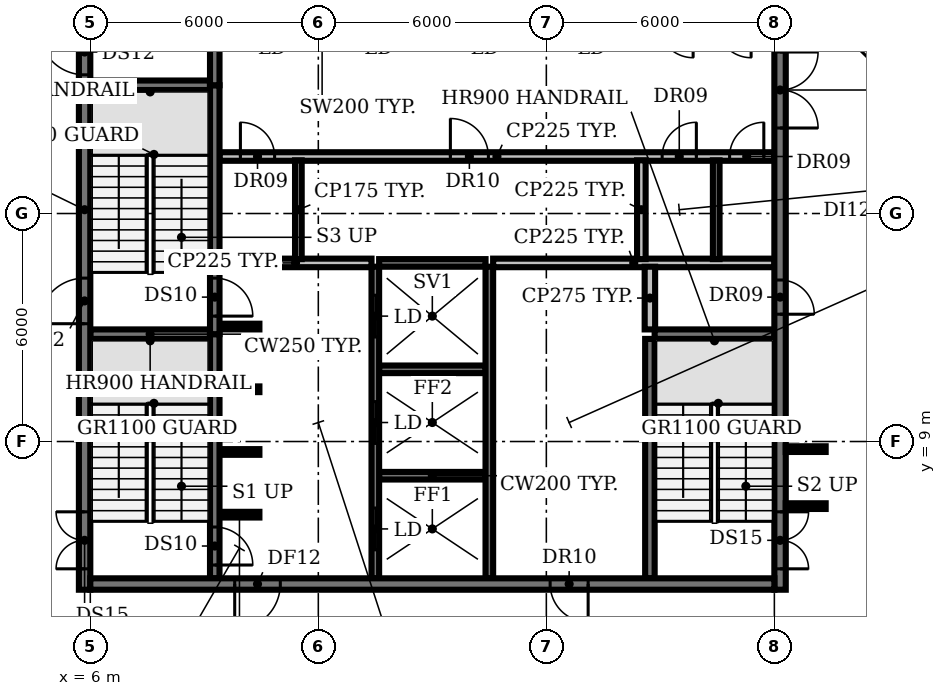
"""IFC4 building model, lengths in metres.
Left out: names, types, materials, properties, quantities, classifications, styles, units other than length and angle.
Written with IfcOpenShell. Run it as: python <this file> out.ifc"""

import sys

from ifc_helpers import new_model, si_unit, direction, frame, frame_2d, origin, place, context, subcontext, project, spatial, rectangle, extrude, element, fill, save


model = new_model("IFC4")
c1 = context("Model", 3, precision=1e-05, world=origin(), true_north=direction((0.0, 1.0)))
c2 = subcontext(c1, "Body", "Model", "MODEL_VIEW")
j1 = project(units=[si_unit("LENGTHUNIT", "METRE"), si_unit("PLANEANGLEUNIT", "RADIAN")], contexts=[c1])
p1 = place(None, origin())
s1 = spatial("IfcSite", under=j1, at=p1, CompositionType="ELEMENT")
p2 = place(p1, origin())
s2 = spatial("IfcBuilding", under=s1, at=p2, CompositionType="ELEMENT")
p3 = place(p2, frame((0.0, 0.0, 289.4)))
s3 = spatial("IfcBuildingStorey", under=s2, at=p3, CompositionType="ELEMENT", Elevation=289.4)
p4 = place(p3, frame((9.4, 7.075, 0.0), z_axis=(0.0, 0.0, 1.0), x_axis=(1.0, 0.0, 0.0)))
e1 = element("IfcWall", 1, at=p4, inside=s3, PredefinedType="SHEAR", context=c2, shape_type="SweptSolid", body=[
    extrude(rectangle(XDim=1.05, YDim=0.15, at=frame_2d((0.525, 0.0))), origin(), (0.0, 0.0, 1.0), 3.85),
])
p5 = place(p3, frame((13.6, 8.1, 0.0), z_axis=(0.0, 0.0, 1.0), x_axis=(1.0, 0.0, 0.0)))
e2 = element("IfcWall", 2, at=p5, inside=s3, PredefinedType="SHEAR", context=c2, shape_type="SweptSolid", body=[
    extrude(rectangle(XDim=2.8, YDim=0.2, at=frame_2d((1.4, 0.0))), origin(), (0.0, 0.0, 1.0), 3.85),
])
for number, where, z_axis, x_axis in (
    (3, (9.4, 8.725, 0.0), (0.0, 0.0, 1.0), (1.0, 0.0, 0.0)),
    (4, (9.4, 10.375, 0.0), (0.0, 0.0, 1.0), (1.0, 0.0, 0.0)),
):
    element("IfcWall", number, at=place(p3, frame(where, z_axis=z_axis, x_axis=x_axis)), inside=s3, PredefinedType="SHEAR", context=c2, shape_type="SweptSolid", body=[
        extrude(rectangle(XDim=1.05, YDim=0.15, at=frame_2d((0.525, 0.0))), origin(), (0.0, 0.0, 1.0), 3.85),
    ])
p6 = place(p3, frame((13.6, 10.9, 0.0), z_axis=(0.0, 0.0, 1.0), x_axis=(1.0, 0.0, 0.0)))
e5 = element("IfcWall", 5, at=p6, inside=s3, PredefinedType="SHEAR", context=c2, shape_type="SweptSolid", body=[
    extrude(rectangle(XDim=2.8, YDim=0.2, at=frame_2d((1.4, 0.0))), origin(), (0.0, 0.0, 1.0), 3.85),
])
for number, where, z_axis, x_axis in (
    (6, (6.0, 11.825, 0.0), (0.0, 0.0, 1.0), (1.0, 0.0, 0.0)),
    (7, (20.85, 11.825, 0.0), (0.0, 0.0, 1.0), (1.0, 0.0, 0.0)),
):
    element("IfcWall", number, at=place(p3, frame(where, z_axis=z_axis, x_axis=x_axis)), inside=s3, PredefinedType="SHEAR", context=c2, shape_type="SweptSolid", body=[
        extrude(rectangle(XDim=3.15, YDim=0.25, at=frame_2d((1.575, 0.0))), origin(), (0.0, 0.0, 1.0), 3.85),
    ])
p7 = place(p3, frame((9.4, 12.025, 0.0), z_axis=(0.0, 0.0, 1.0), x_axis=(1.0, 0.0, 0.0)))
e8 = element("IfcWall", 8, at=p7, inside=s3, PredefinedType="SHEAR", context=c2, shape_type="SweptSolid", body=[
    extrude(rectangle(XDim=1.05, YDim=0.15, at=frame_2d((0.525, 0.0))), origin(), (0.0, 0.0, 1.0), 3.85),
])
p8 = place(p3, frame((9.4, 13.7, 0.0), z_axis=(0.0, 0.0, 1.0), x_axis=(1.0, 0.0, 0.0)))
e9 = element("IfcWall", 9, at=p8, inside=s3, PredefinedType="PARTITIONING", context=c2, shape_type="SweptSolid", body=[
    extrude(rectangle(XDim=4.0, YDim=0.225, at=frame_2d((2.0, 0.0))), origin(), (0.0, 0.0, 1.0), 3.85),
])
p9 = place(p3, frame((13.6, 13.7, 0.0), z_axis=(0.0, 0.0, 1.0), x_axis=(1.0, 0.0, 0.0)))
e10 = element("IfcWall", 10, at=p9, inside=s3, PredefinedType="SHEAR", context=c2, shape_type="SweptSolid", body=[
    extrude(rectangle(XDim=2.8, YDim=0.2, at=frame_2d((1.4, 0.0))), origin(), (0.0, 0.0, 1.0), 3.85),
])
p10 = place(p3, frame((16.6, 13.7, 0.0), z_axis=(0.0, 0.0, 1.0), x_axis=(1.0, 0.0, 0.0)))
e11 = element("IfcWall", 11, at=p10, inside=s3, PredefinedType="PARTITIONING", context=c2, shape_type="SweptSolid", body=[
    extrude(rectangle(XDim=7.4, YDim=0.225, at=frame_2d((3.7, 0.0))), origin(), (0.0, 0.0, 1.0), 3.85),
])
p11 = place(p3, frame((9.4, 16.5, 0.0), z_axis=(0.0, 0.0, 1.0), x_axis=(1.0, 0.0, 0.0)))
e12 = element("IfcWall", 12, at=p11, inside=s3, PredefinedType="PARTITIONING", context=c2, shape_type="SweptSolid", body=[
    extrude(rectangle(XDim=14.6, YDim=0.225, at=frame_2d((7.3, 0.0))), origin(), (0.0, 0.0, 1.0), 3.85),
])
p12 = place(p11, frame((0.55, 0.0, 0.0)))
e13 = element("IfcOpeningElement", 13, at=p12, cuts=e12, PredefinedType="OPENING", context=c2, shape_type="SweptSolid", body=[
    extrude(rectangle(XDim=0.9, YDim=2.1, at=frame_2d((0.45, 1.05))), frame((0.0, 0.123, 0.0), z_axis=(0.0, -1.0, 0.0), x_axis=(1.0, 0.0, 0.0)), (0.0, 0.0, 1.0), 0.245),
])
p13 = place(p11, frame((6.075, 0.0, 0.0)))
e14 = element("IfcOpeningElement", 14, at=p13, cuts=e12, PredefinedType="OPENING", context=c2, shape_type="SweptSolid", body=[
    extrude(rectangle(XDim=1.0, YDim=2.1, at=frame_2d((0.5, 1.05))), frame((0.0, 0.123, 0.0), z_axis=(0.0, -1.0, 0.0), x_axis=(1.0, 0.0, 0.0)), (0.0, 0.0, 1.0), 0.245),
])
p14 = place(p11, frame((11.647, 0.0, 0.0)))
e15 = element("IfcOpeningElement", 15, at=p14, cuts=e12, PredefinedType="OPENING", context=c2, shape_type="SweptSolid", body=[
    extrude(rectangle(XDim=0.9, YDim=2.1, at=frame_2d((0.45, 1.05))), frame((0.0, 0.123, 0.0), z_axis=(0.0, -1.0, 0.0), x_axis=(1.0, 0.0, 0.0)), (0.0, 0.0, 1.0), 0.245),
])
p15 = place(p11, frame((13.423, 0.0, 0.0)))
e16 = element("IfcOpeningElement", 16, at=p15, cuts=e12, PredefinedType="OPENING", context=c2, shape_type="SweptSolid", body=[
    extrude(rectangle(XDim=0.9, YDim=2.1, at=frame_2d((0.45, 1.05))), frame((0.0, 0.123, 0.0), z_axis=(0.0, -1.0, 0.0), x_axis=(1.0, 0.0, 0.0)), (0.0, 0.0, 1.0), 0.245),
])
p16 = place(p3, frame((6.0, 18.375, 0.0), z_axis=(0.0, 0.0, 1.0), x_axis=(1.0, 0.0, 0.0)))
e17 = element("IfcWall", 17, at=p16, inside=s3, PredefinedType="SHEAR", context=c2, shape_type="SweptSolid", body=[
    extrude(rectangle(XDim=3.15, YDim=0.25, at=frame_2d((1.575, 0.0))), origin(), (0.0, 0.0, 1.0), 3.85),
])
p17 = place(p3, frame((9.275, 11.825, 0.0), z_axis=(0.0, 0.0, 1.0), x_axis=(0.0, -1.0, 0.0)))
e18 = element("IfcWall", 18, at=p17, inside=s3, PredefinedType="SHEAR", context=c2, shape_type="SweptSolid", body=[
    extrude(rectangle(XDim=6.425, YDim=0.25, at=frame_2d((3.212, 0.0))), origin(), (0.0, 0.0, 1.0), 3.85),
])
p18 = place(p17, frame((5.075, 0.0, 0.0)))
e19 = element("IfcOpeningElement", 19, at=p18, cuts=e18, PredefinedType="OPENING", context=c2, shape_type="SweptSolid", body=[
    extrude(rectangle(XDim=1.0, YDim=2.1, at=frame_2d((0.5, 1.05))), frame((0.0, 0.135, 0.0), z_axis=(0.0, -1.0, 0.0), x_axis=(1.0, 0.0, 0.0)), (0.0, 0.0, 1.0), 0.27),
])
p19 = place(p3, frame((9.275, 18.375, 0.0), z_axis=(0.0, 0.0, 1.0), x_axis=(0.0, -1.0, 0.0)))
e20 = element("IfcWall", 20, at=p19, inside=s3, PredefinedType="SHEAR", context=c2, shape_type="SweptSolid", body=[
    extrude(rectangle(XDim=6.55, YDim=0.25, at=frame_2d((3.275, 0.0))), origin(), (0.0, 0.0, 1.0), 3.85),
])
p20 = place(p19, frame((5.075, 0.0, 0.0)))
e21 = element("IfcOpeningElement", 21, at=p20, cuts=e20, PredefinedType="OPENING", context=c2, shape_type="SweptSolid", body=[
    extrude(rectangle(XDim=1.0, YDim=2.1, at=frame_2d((0.5, 1.05))), frame((0.0, 0.135, 0.0), z_axis=(0.0, -1.0, 0.0), x_axis=(1.0, 0.0, 0.0)), (0.0, 0.0, 1.0), 0.27),
])
p21 = place(p3, frame((9.275, 18.375, 0.0), z_axis=(0.0, 0.0, 1.0), x_axis=(0.0, 1.0, 0.0)))
e22 = element("IfcWall", 22, at=p21, inside=s3, PredefinedType="SHEAR", context=c2, shape_type="SweptSolid", body=[
    extrude(rectangle(XDim=6.425, YDim=0.25, at=frame_2d((3.212, 0.0))), origin(), (0.0, 0.0, 1.0), 3.85),
])
p22 = place(p3, frame((11.475, 13.8, 0.0), z_axis=(0.0, 0.0, 1.0), x_axis=(0.0, 1.0, 0.0)))
e23 = element("IfcWall", 23, at=p22, inside=s3, PredefinedType="PARTITIONING", context=c2, shape_type="SweptSolid", body=[
    extrude(rectangle(XDim=2.6, YDim=0.175, at=frame_2d((1.3, 0.0))), origin(), (0.0, 0.0, 1.0), 3.85),
])
p23 = place(p3, frame((13.5, 5.4, 0.0), z_axis=(0.0, 0.0, 1.0), x_axis=(0.0, 1.0, 0.0)))
e24 = element("IfcWall", 24, at=p23, inside=s3, PredefinedType="SHEAR", context=c2, shape_type="SweptSolid", body=[
    extrude(rectangle(XDim=8.2, YDim=0.2, at=frame_2d((4.1, 0.0))), origin(), (0.0, 0.0, 1.0), 3.85),
])
p24 = place(p23, frame((0.75, 0.0, 0.0)))
e25 = element("IfcOpeningElement", 25, at=p24, cuts=e24, PredefinedType="OPENING", context=c2, shape_type="SweptSolid", body=[
    extrude(rectangle(XDim=1.1, YDim=2.1, at=frame_2d((0.55, 1.05))), frame((0.0, 0.11, 0.0), z_axis=(0.0, -1.0, 0.0), x_axis=(1.0, 0.0, 0.0)), (0.0, 0.0, 1.0), 0.22),
])
p25 = place(p23, frame((3.55, 0.0, 0.0)))
e26 = element("IfcOpeningElement", 26, at=p25, cuts=e24, PredefinedType="OPENING", context=c2, shape_type="SweptSolid", body=[
    extrude(rectangle(XDim=1.1, YDim=2.1, at=frame_2d((0.55, 1.05))), frame((0.0, 0.11, 0.0), z_axis=(0.0, -1.0, 0.0), x_axis=(1.0, 0.0, 0.0)), (0.0, 0.0, 1.0), 0.22),
])
p26 = place(p23, frame((6.35, 0.0, 0.0)))
e27 = element("IfcOpeningElement", 27, at=p26, cuts=e24, PredefinedType="OPENING", context=c2, shape_type="SweptSolid", body=[
    extrude(rectangle(XDim=1.1, YDim=2.1, at=frame_2d((0.55, 1.05))), frame((0.0, 0.11, 0.0), z_axis=(0.0, -1.0, 0.0), x_axis=(1.0, 0.0, 0.0)), (0.0, 0.0, 1.0), 0.22),
])
p27 = place(p3, frame((16.5, 5.4, 0.0), z_axis=(0.0, 0.0, 1.0), x_axis=(0.0, 1.0, 0.0)))
e28 = element("IfcWall", 28, at=p27, inside=s3, PredefinedType="SHEAR", context=c2, shape_type="SweptSolid", body=[
    extrude(rectangle(XDim=8.2, YDim=0.2, at=frame_2d((4.1, 0.0))), origin(), (0.0, 0.0, 1.0), 3.85),
])
p28 = place(p3, frame((20.5, 13.8, 0.0), z_axis=(0.0, 0.0, 1.0), x_axis=(0.0, 1.0, 0.0)))
e29 = element("IfcWall", 29, at=p28, inside=s3, PredefinedType="PARTITIONING", context=c2, shape_type="SweptSolid", body=[
    extrude(rectangle(XDim=2.6, YDim=0.225, at=frame_2d((1.3, 0.0))), origin(), (0.0, 0.0, 1.0), 3.85),
])
p29 = place(p3, frame((20.725, 5.4, 0.0), z_axis=(0.0, 0.0, 1.0), x_axis=(0.0, 1.0, 0.0)))
e30 = element("IfcWall", 30, at=p29, inside=s3, PredefinedType="SHEAR", context=c2, shape_type="SweptSolid", body=[
    extrude(rectangle(XDim=6.3, YDim=0.25, at=frame_2d((3.15, 0.0))), origin(), (0.0, 0.0, 1.0), 3.85),
])
p30 = place(p3, frame((20.725, 11.95, 0.0), z_axis=(0.0, 0.0, 1.0), x_axis=(0.0, 1.0, 0.0)))
e31 = element("IfcWall", 31, at=p30, inside=s3, PredefinedType="PARTITIONING", context=c2, shape_type="SweptSolid", body=[
    extrude(rectangle(XDim=1.65, YDim=0.275, at=frame_2d((0.825, 0.0))), origin(), (0.0, 0.0, 1.0), 3.85),
])
p31 = place(p3, frame((22.47, 13.8, 0.0), z_axis=(0.0, 0.0, 1.0), x_axis=(0.0, 1.0, 0.0)))
e32 = element("IfcWall", 32, at=p31, inside=s3, PredefinedType="PARTITIONING", context=c2, shape_type="SweptSolid", body=[
    extrude(rectangle(XDim=2.6, YDim=0.175, at=frame_2d((1.3, 0.0))), origin(), (0.0, 0.0, 1.0), 3.85),
])
p32 = place(p3, frame((5.85, 5.1, 0.0), z_axis=(0.0, 0.0, 1.0), x_axis=(0.0, 1.0, 0.0)))
e33 = element("IfcWall", 33, at=p32, inside=s3, PredefinedType="SHEAR", context=c2, shape_type="SweptSolid", body=[
    extrude(rectangle(XDim=20.0, YDim=0.3, at=frame_2d((10.0, 0.0))), origin(), (0.0, 0.0, 1.0), 3.85),
])
p33 = place(p32, frame((0.55, 0.0, 0.0)))
e34 = element("IfcOpeningElement", 34, at=p33, cuts=e33, PredefinedType="OPENING", context=c2, shape_type="SweptSolid", body=[
    extrude(rectangle(XDim=1.5, YDim=2.1, at=frame_2d((0.75, 1.05))), frame((0.0, 0.16, 0.0), z_axis=(0.0, -1.0, 0.0), x_axis=(1.0, 0.0, 0.0)), (0.0, 0.0, 1.0), 0.32),
])
p34 = place(p32, frame((7.0, 0.0, 0.0)))
e35 = element("IfcOpeningElement", 35, at=p34, cuts=e33, PredefinedType="OPENING", context=c2, shape_type="SweptSolid", body=[
    extrude(rectangle(XDim=1.2, YDim=2.1, at=frame_2d((0.6, 1.05))), frame((0.0, 0.16, 0.0), z_axis=(0.0, -1.0, 0.0), x_axis=(1.0, 0.0, 0.0)), (0.0, 0.0, 1.0), 0.32),
])
p35 = place(p32, frame((13.55, 0.0, 0.0)))
e36 = element("IfcOpeningElement", 36, at=p35, cuts=e33, PredefinedType="OPENING", context=c2, shape_type="SweptSolid", body=[
    extrude(rectangle(XDim=1.2, YDim=2.1, at=frame_2d((0.6, 1.05))), frame((0.0, 0.16, 0.0), z_axis=(0.0, -1.0, 0.0), x_axis=(1.0, 0.0, 0.0)), (0.0, 0.0, 1.0), 0.32),
])
p36 = place(p3, frame((24.15, 25.655, 0.0), z_axis=(0.0, 0.0, 1.0), x_axis=(0.0, -1.0, 0.0)))
e37 = element("IfcWall", 37, at=p36, inside=s3, PredefinedType="SHEAR", context=c2, shape_type="SweptSolid", body=[
    extrude(rectangle(XDim=20.555, YDim=0.3, at=frame_2d((10.277, 0.0))), origin(), (0.0, 0.0, 1.0), 3.85),
])
p37 = place(p36, frame((18.505, 0.0, 0.0)))
e38 = element("IfcOpeningElement", 38, at=p37, cuts=e37, PredefinedType="OPENING", context=c2, shape_type="SweptSolid", body=[
    extrude(rectangle(XDim=1.5, YDim=2.1, at=frame_2d((0.75, 1.05))), frame((0.0, 0.16, 0.0), z_axis=(0.0, -1.0, 0.0), x_axis=(1.0, 0.0, 0.0)), (0.0, 0.0, 1.0), 0.32),
])
p38 = place(p36, frame((12.405, 0.0, 0.0)))
e39 = element("IfcOpeningElement", 39, at=p38, cuts=e37, PredefinedType="OPENING", context=c2, shape_type="SweptSolid", body=[
    extrude(rectangle(XDim=0.9, YDim=2.1, at=frame_2d((0.45, 1.05))), frame((0.0, 0.16, 0.0), z_axis=(0.0, -1.0, 0.0), x_axis=(1.0, 0.0, 0.0)), (0.0, 0.0, 1.0), 0.32),
])
p39 = place(p36, frame((6.405, 0.0, 0.0)))
e40 = element("IfcOpeningElement", 40, at=p39, cuts=e37, PredefinedType="OPENING", context=c2, shape_type="SweptSolid", body=[
    extrude(rectangle(XDim=2.0, YDim=2.1, at=frame_2d((1.0, 1.05))), frame((0.0, 0.16, 0.0), z_axis=(0.0, -1.0, 0.0), x_axis=(1.0, 0.0, 0.0)), (0.0, 0.0, 1.0), 0.32),
])
p40 = place(p3, frame((24.0, 5.25, 0.0), z_axis=(0.0, 0.0, 1.0), x_axis=(-1.0, 0.0, 0.0)))
e41 = element("IfcWall", 41, at=p40, inside=s3, PredefinedType="SHEAR", context=c2, shape_type="SweptSolid", body=[
    extrude(rectangle(XDim=18.0, YDim=0.3, at=frame_2d((9.0, 0.0))), origin(), (0.0, 0.0, 1.0), 3.85),
])
p41 = place(p40, frame((13.0, 0.0, 0.0)))
e42 = element("IfcOpeningElement", 42, at=p41, cuts=e41, PredefinedType="OPENING", context=c2, shape_type="SweptSolid", body=[
    extrude(rectangle(XDim=1.2, YDim=2.1, at=frame_2d((0.6, 1.05))), frame((0.0, 0.16, 0.0), z_axis=(0.0, -1.0, 0.0), x_axis=(1.0, 0.0, 0.0)), (0.0, 0.0, 1.0), 0.32),
])
p42 = place(p40, frame((4.9, 0.0, 0.0)))
e43 = element("IfcOpeningElement", 43, at=p42, cuts=e41, PredefinedType="OPENING", context=c2, shape_type="SweptSolid", body=[
    extrude(rectangle(XDim=1.0, YDim=2.1, at=frame_2d((0.5, 1.05))), frame((0.0, 0.16, 0.0), z_axis=(0.0, -1.0, 0.0), x_axis=(1.0, 0.0, 0.0)), (0.0, 0.0, 1.0), 0.32),
])
for number, where, z_axis, x_axis in (
    (44, (24.3, 7.3, 0.0), (0.0, 0.0, 1.0), (1.0, 0.0, 0.0)),
    (45, (24.3, 8.8, 0.0), (0.0, 0.0, 1.0), (1.0, 0.0, 0.0)),
):
    element("IfcWall", number, at=place(p3, frame(where, z_axis=z_axis, x_axis=x_axis)), inside=s3, PredefinedType="PARTITIONING", context=c2, shape_type="SweptSolid", body=[
        extrude(rectangle(XDim=1.05, YDim=0.15, at=frame_2d((0.525, 0.0))), origin(), (0.0, 0.0, 1.0), 2.9),
    ])
p43 = place(p12, origin())
e46 = element("IfcDoor", 46, at=p43, inside=s3, OperationType="SINGLE_SWING_LEFT", PredefinedType="DOOR", context=c2, shape_type="SweptSolid", body=[
    extrude(rectangle(XDim=0.9, YDim=2.1, at=frame_2d((0.45, 1.05))), frame((0.0, 0.025, 0.0), z_axis=(0.0, -1.0, 0.0), x_axis=(1.0, 0.0, 0.0)), (0.0, 0.0, 1.0), 0.05),
])
fill(e13, e46)
p44 = place(p13, origin())
e47 = element("IfcDoor", 47, at=p44, inside=s3, OperationType="SINGLE_SWING_LEFT", PredefinedType="DOOR", context=c2, shape_type="SweptSolid", body=[
    extrude(rectangle(XDim=1.0, YDim=2.1, at=frame_2d((0.5, 1.05))), frame((0.0, 0.025, 0.0), z_axis=(0.0, -1.0, 0.0), x_axis=(1.0, 0.0, 0.0)), (0.0, 0.0, 1.0), 0.05),
])
fill(e14, e47)
p45 = place(p14, origin())
e48 = element("IfcDoor", 48, at=p45, inside=s3, OperationType="SINGLE_SWING_RIGHT", PredefinedType="DOOR", context=c2, shape_type="SweptSolid", body=[
    extrude(rectangle(XDim=0.9, YDim=2.1, at=frame_2d((0.45, 1.05))), frame((0.0, 0.025, 0.0), z_axis=(0.0, -1.0, 0.0), x_axis=(1.0, 0.0, 0.0)), (0.0, 0.0, 1.0), 0.05),
])
fill(e15, e48)
p46 = place(p15, origin())
e49 = element("IfcDoor", 49, at=p46, inside=s3, OperationType="SINGLE_SWING_RIGHT", PredefinedType="DOOR", context=c2, shape_type="SweptSolid", body=[
    extrude(rectangle(XDim=0.9, YDim=2.1, at=frame_2d((0.45, 1.05))), frame((0.0, 0.025, 0.0), z_axis=(0.0, -1.0, 0.0), x_axis=(1.0, 0.0, 0.0)), (0.0, 0.0, 1.0), 0.05),
])
fill(e16, e49)
p47 = place(p18, origin())
e50 = element("IfcDoor", 50, at=p47, inside=s3, OperationType="SINGLE_SWING_RIGHT", PredefinedType="DOOR", context=c2, shape_type="SweptSolid", body=[
    extrude(rectangle(XDim=1.0, YDim=2.1, at=frame_2d((0.5, 1.05))), frame((0.0, 0.025, 0.0), z_axis=(0.0, -1.0, 0.0), x_axis=(1.0, 0.0, 0.0)), (0.0, 0.0, 1.0), 0.05),
])
fill(e19, e50)
p48 = place(p20, origin())
e51 = element("IfcDoor", 51, at=p48, inside=s3, OperationType="SINGLE_SWING_RIGHT", PredefinedType="DOOR", context=c2, shape_type="SweptSolid", body=[
    extrude(rectangle(XDim=1.0, YDim=2.1, at=frame_2d((0.5, 1.05))), frame((0.0, 0.025, 0.0), z_axis=(0.0, -1.0, 0.0), x_axis=(1.0, 0.0, 0.0)), (0.0, 0.0, 1.0), 0.05),
])
fill(e21, e51)
p49 = place(p24, origin())
e52 = element("IfcDoor", 52, at=p49, inside=s3, OperationType="DOUBLE_DOOR_SLIDING", PredefinedType="DOOR", context=c2, shape_type="SweptSolid", body=[
    extrude(rectangle(XDim=1.1, YDim=2.1, at=frame_2d((0.55, 1.05))), frame((0.0, 0.025, 0.0), z_axis=(0.0, -1.0, 0.0), x_axis=(1.0, 0.0, 0.0)), (0.0, 0.0, 1.0), 0.05),
])
fill(e25, e52)
p50 = place(p25, origin())
e53 = element("IfcDoor", 53, at=p50, inside=s3, OperationType="DOUBLE_DOOR_SLIDING", PredefinedType="DOOR", context=c2, shape_type="SweptSolid", body=[
    extrude(rectangle(XDim=1.1, YDim=2.1, at=frame_2d((0.55, 1.05))), frame((0.0, 0.025, 0.0), z_axis=(0.0, -1.0, 0.0), x_axis=(1.0, 0.0, 0.0)), (0.0, 0.0, 1.0), 0.05),
])
fill(e26, e53)
p51 = place(p26, origin())
e54 = element("IfcDoor", 54, at=p51, inside=s3, OperationType="DOUBLE_DOOR_SLIDING", PredefinedType="DOOR", context=c2, shape_type="SweptSolid", body=[
    extrude(rectangle(XDim=1.1, YDim=2.1, at=frame_2d((0.55, 1.05))), frame((0.0, 0.025, 0.0), z_axis=(0.0, -1.0, 0.0), x_axis=(1.0, 0.0, 0.0)), (0.0, 0.0, 1.0), 0.05),
])
fill(e27, e54)
p52 = place(p33, origin())
e55 = element("IfcDoor", 55, at=p52, inside=s3, OperationType="DOUBLE_DOOR_SINGLE_SWING", PredefinedType="DOOR", context=c2, shape_type="SweptSolid", body=[
    extrude(rectangle(XDim=1.5, YDim=2.1, at=frame_2d((0.75, 1.05))), frame((0.0, 0.025, 0.0), z_axis=(0.0, -1.0, 0.0), x_axis=(1.0, 0.0, 0.0)), (0.0, 0.0, 1.0), 0.05),
])
fill(e34, e55)
p53 = place(p34, origin())
e56 = element("IfcDoor", 56, at=p53, inside=s3, OperationType="SINGLE_SWING_LEFT", PredefinedType="DOOR", context=c2, shape_type="SweptSolid", body=[
    extrude(rectangle(XDim=1.2, YDim=2.1, at=frame_2d((0.6, 1.05))), frame((0.0, 0.025, 0.0), z_axis=(0.0, -1.0, 0.0), x_axis=(1.0, 0.0, 0.0)), (0.0, 0.0, 1.0), 0.05),
])
fill(e35, e56)
p54 = place(p35, origin())
e57 = element("IfcDoor", 57, at=p54, inside=s3, OperationType="SINGLE_SWING_RIGHT", PredefinedType="DOOR", context=c2, shape_type="SweptSolid", body=[
    extrude(rectangle(XDim=1.2, YDim=2.1, at=frame_2d((0.6, 1.05))), frame((0.0, 0.025, 0.0), z_axis=(0.0, -1.0, 0.0), x_axis=(1.0, 0.0, 0.0)), (0.0, 0.0, 1.0), 0.05),
])
fill(e36, e57)
p55 = place(p37, origin())
e58 = element("IfcDoor", 58, at=p55, inside=s3, OperationType="DOUBLE_DOOR_SINGLE_SWING", PredefinedType="DOOR", context=c2, shape_type="SweptSolid", body=[
    extrude(rectangle(XDim=1.5, YDim=2.1, at=frame_2d((0.75, 1.05))), frame((0.0, 0.025, 0.0), z_axis=(0.0, -1.0, 0.0), x_axis=(1.0, 0.0, 0.0)), (0.0, 0.0, 1.0), 0.05),
])
fill(e38, e58)
p56 = place(p38, origin())
e59 = element("IfcDoor", 59, at=p56, inside=s3, OperationType="SINGLE_SWING_RIGHT", PredefinedType="DOOR", context=c2, shape_type="SweptSolid", body=[
    extrude(rectangle(XDim=0.9, YDim=2.1, at=frame_2d((0.45, 1.05))), frame((0.0, 0.025, 0.0), z_axis=(0.0, -1.0, 0.0), x_axis=(1.0, 0.0, 0.0)), (0.0, 0.0, 1.0), 0.05),
])
fill(e39, e59)
p57 = place(p39, origin())
e60 = element("IfcDoor", 60, at=p57, inside=s3, OperationType="DOUBLE_DOOR_SINGLE_SWING", PredefinedType="DOOR", context=c2, shape_type="SweptSolid", body=[
    extrude(rectangle(XDim=2.0, YDim=2.1, at=frame_2d((1.0, 1.05))), frame((0.0, 0.025, 0.0), z_axis=(0.0, -1.0, 0.0), x_axis=(1.0, 0.0, 0.0)), (0.0, 0.0, 1.0), 0.05),
])
fill(e40, e60)
p58 = place(p41, origin())
e61 = element("IfcDoor", 61, at=p58, inside=s3, OperationType="SINGLE_SWING_RIGHT", PredefinedType="DOOR", context=c2, shape_type="SweptSolid", body=[
    extrude(rectangle(XDim=1.2, YDim=2.1, at=frame_2d((0.6, 1.05))), frame((0.0, 0.025, 0.0), z_axis=(0.0, -1.0, 0.0), x_axis=(1.0, 0.0, 0.0)), (0.0, 0.0, 1.0), 0.05),
])
fill(e42, e61)
p59 = place(p42, origin())
e62 = element("IfcDoor", 62, at=p59, inside=s3, OperationType="SINGLE_SWING_LEFT", PredefinedType="DOOR", context=c2, shape_type="SweptSolid", body=[
    extrude(rectangle(XDim=1.0, YDim=2.1, at=frame_2d((0.5, 1.05))), frame((0.0, 0.025, 0.0), z_axis=(0.0, -1.0, 0.0), x_axis=(1.0, 0.0, 0.0)), (0.0, 0.0, 1.0), 0.05),
])
fill(e43, e62)
save(model, sys.argv[1])
